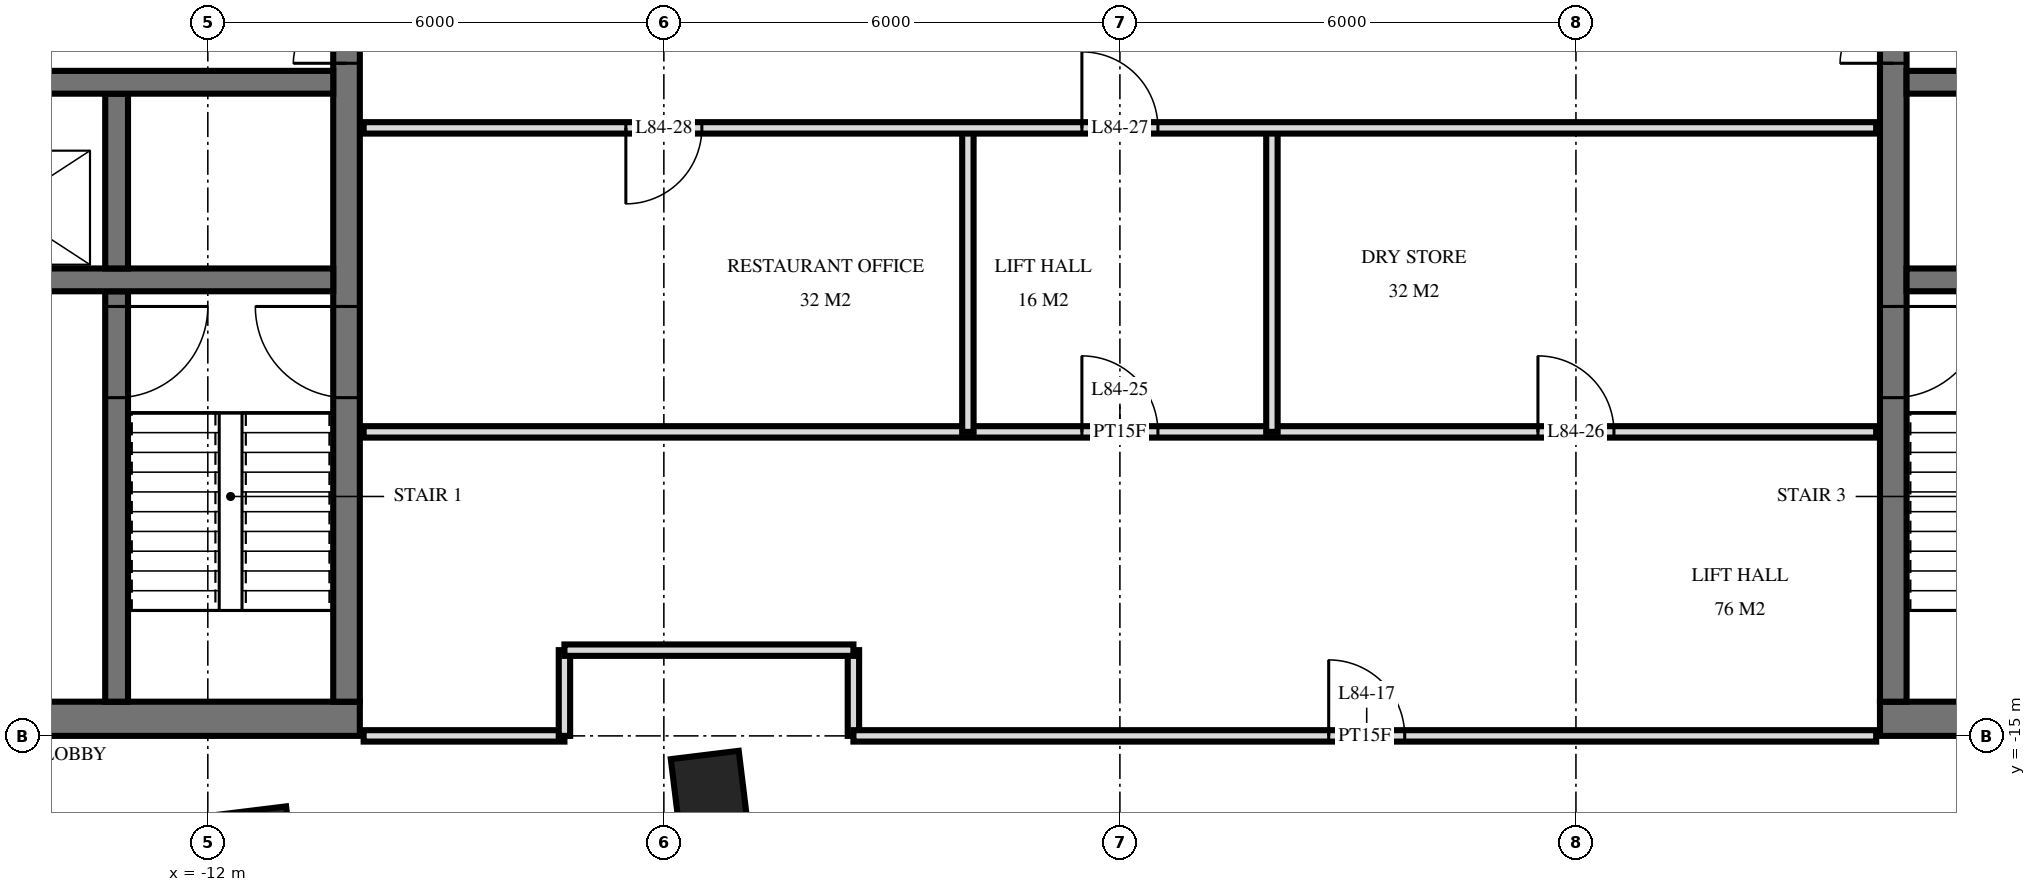
"""IFC4 building model, lengths in metres.
Left out: names, types, materials, properties, quantities, classifications, styles, units other than length and angle.
Written with IfcOpenShell. Run it as: python <this file> out.ifc"""

import sys

from ifc_helpers import new_model, si_unit, direction, frame, frame_2d, origin, origin_2d, place, context, subcontext, project, spatial, rectangle, extrude, element, fill, save


model = new_model("IFC4")
c1 = context("Model", 3, precision=1e-05, world=origin(), true_north=direction((0.0, 1.0)))
c2 = subcontext(c1, "Body", "Model", "MODEL_VIEW")
j1 = project(units=[si_unit("LENGTHUNIT", "METRE"), si_unit("PLANEANGLEUNIT", "RADIAN")], contexts=[c1])
p1 = place(None, origin())
s1 = spatial("IfcSite", under=j1, at=p1, CompositionType="ELEMENT")
p2 = place(p1, origin())
s2 = spatial("IfcBuilding", under=s1, at=p2, CompositionType="ELEMENT")
p3 = place(p2, frame((0.0, 0.0, 318.6)))
s3 = spatial("IfcBuildingStorey", under=s2, at=p3, CompositionType="ELEMENT", Elevation=318.6)
for number, where, z_axis, x_axis in (
    (1, (-11.362, -16.429, 0.0), (0.0, 0.0, 1.0), (0.993, 0.122, 0.0)),
    (2, (-5.407, -15.698, 0.0), (0.0, 0.0, 1.0), (0.993, 0.122, 0.0)),
):
    element("IfcColumn", number, at=place(p3, frame(where, z_axis=z_axis, x_axis=x_axis)), inside=s3, PredefinedType="COLUMN", context=c2, shape_type="SweptSolid", body=[
        extrude(rectangle(XDim=0.9, YDim=0.9, at=origin_2d()), origin(), (0.0, 0.0, 1.0), 4.0),
    ])
p4 = place(p3, frame((-19.5, -14.775, 0.0), z_axis=(0.0, 0.0, 1.0), x_axis=(1.0, 0.0, 0.0)))
e3 = element("IfcWall", 3, at=p4, inside=s3, PredefinedType="SHEAR", context=c2, shape_type="SweptSolid", body=[
    extrude(rectangle(XDim=9.5, YDim=0.45, at=frame_2d((4.75, 0.0))), origin(), (0.0, 0.0, 1.0), 4.0),
])
p5 = place(p4, frame((1.2, 0.0, 0.0)))
e4 = element("IfcOpeningElement", 4, at=p5, cuts=e3, PredefinedType="OPENING", context=c2, shape_type="SweptSolid", body=[
    extrude(rectangle(XDim=1.2, YDim=2.1, at=frame_2d((0.6, 1.05))), frame((0.0, 0.235, 0.0), z_axis=(0.0, -1.0, 0.0), x_axis=(1.0, 0.0, 0.0)), (0.0, 0.0, 1.0), 0.47),
])
p6 = place(p4, frame((4.25, 0.0, 0.0)))
e5 = element("IfcOpeningElement", 5, at=p6, cuts=e3, PredefinedType="OPENING", context=c2, shape_type="SweptSolid", body=[
    extrude(rectangle(XDim=1.1, YDim=2.1, at=frame_2d((0.55, 1.05))), frame((0.0, 0.235, 0.0), z_axis=(0.0, -1.0, 0.0), x_axis=(1.0, 0.0, 0.0)), (0.0, 0.0, 1.0), 0.47),
])
p7 = place(p3, frame((-10.175, -14.55, 0.0), z_axis=(0.0, 0.0, 1.0), x_axis=(0.0, 1.0, 0.0)))
e6 = element("IfcWall", 6, at=p7, inside=s3, PredefinedType="SHEAR", context=c2, shape_type="SweptSolid", body=[
    extrude(rectangle(XDim=14.1, YDim=0.35, at=frame_2d((7.05, 0.0))), origin(), (0.0, 0.0, 1.0), 4.0),
])
p8 = place(p7, frame((8.4, 0.0, 0.0)))
e7 = element("IfcOpeningElement", 7, at=p8, cuts=e6, PredefinedType="OPENING", context=c2, shape_type="SweptSolid", body=[
    extrude(rectangle(XDim=1.4, YDim=2.4, at=frame_2d((0.7, 1.2))), frame((0.0, 0.185, 0.0), z_axis=(0.0, -1.0, 0.0), x_axis=(1.0, 0.0, 0.0)), (0.0, 0.0, 1.0), 0.37),
])
p9 = place(p7, frame((10.0, 0.0, 0.0)))
e8 = element("IfcOpeningElement", 8, at=p9, cuts=e6, PredefinedType="OPENING", context=c2, shape_type="SweptSolid", body=[
    extrude(rectangle(XDim=1.4, YDim=2.4, at=frame_2d((0.7, 1.2))), frame((0.0, 0.185, 0.0), z_axis=(0.0, -1.0, 0.0), x_axis=(1.0, 0.0, 0.0)), (0.0, 0.0, 1.0), 0.37),
])
p10 = place(p7, frame((4.0, 0.0, 0.0)))
e9 = element("IfcOpeningElement", 9, at=p10, cuts=e6, PredefinedType="OPENING", context=c2, shape_type="SweptSolid", body=[
    extrude(rectangle(XDim=1.2, YDim=2.1, at=frame_2d((0.6, 1.05))), frame((0.0, 0.185, 0.0), z_axis=(0.0, -1.0, 0.0), x_axis=(1.0, 0.0, 0.0)), (0.0, 0.0, 1.0), 0.37),
])
p11 = place(p3, frame((-19.05, -6.4, 0.0), z_axis=(0.0, 0.0, 1.0), x_axis=(1.0, 0.0, 0.0)))
e10 = element("IfcWall", 10, at=p11, inside=s3, PredefinedType="SHEAR", context=c2, shape_type="SweptSolid", body=[
    extrude(rectangle(XDim=8.7, YDim=0.3, at=frame_2d((4.35, 0.0))), origin(), (0.0, 0.0, 1.0), 4.0),
])
p12 = place(p11, frame((0.8, 0.0, 0.0)))
e11 = element("IfcOpeningElement", 11, at=p12, cuts=e10, PredefinedType="OPENING", context=c2, shape_type="SweptSolid", body=[
    extrude(rectangle(XDim=1.1, YDim=2.1, at=frame_2d((0.55, 1.05))), frame((0.0, 0.16, 0.0), z_axis=(0.0, -1.0, 0.0), x_axis=(1.0, 0.0, 0.0)), (0.0, 0.0, 1.0), 0.32),
])
p13 = place(p3, frame((-19.05, -9.0, 0.0), z_axis=(0.0, 0.0, 1.0), x_axis=(1.0, 0.0, 0.0)))
e12 = element("IfcWall", 12, at=p13, inside=s3, PredefinedType="SHEAR", context=c2, shape_type="SweptSolid", body=[
    extrude(rectangle(XDim=8.7, YDim=0.3, at=frame_2d((4.35, 0.0))), origin(), (0.0, 0.0, 1.0), 4.0),
])
p14 = place(p13, frame((3.8, 0.0, 0.0)))
e13 = element("IfcOpeningElement", 13, at=p14, cuts=e12, PredefinedType="OPENING", context=c2, shape_type="SweptSolid", body=[
    extrude(rectangle(XDim=1.1, YDim=2.1, at=frame_2d((0.55, 1.05))), frame((0.0, 0.16, 0.0), z_axis=(0.0, -1.0, 0.0), x_axis=(1.0, 0.0, 0.0)), (0.0, 0.0, 1.0), 0.32),
])
p15 = place(p3, frame((-13.2, -8.85, 0.0), z_axis=(0.0, 0.0, 1.0), x_axis=(0.0, 1.0, 0.0)))
e14 = element("IfcWall", 14, at=p15, inside=s3, PredefinedType="SHEAR", context=c2, shape_type="SweptSolid", body=[
    extrude(rectangle(XDim=2.3, YDim=0.3, at=frame_2d((1.15, 0.0))), origin(), (0.0, 0.0, 1.0), 4.0),
])
p16 = place(p3, frame((-13.2, -14.55, 0.0), z_axis=(0.0, 0.0, 1.0), x_axis=(0.0, 1.0, 0.0)))
e15 = element("IfcWall", 15, at=p16, inside=s3, PredefinedType="SHEAR", context=c2, shape_type="SweptSolid", body=[
    extrude(rectangle(XDim=5.4, YDim=0.3, at=frame_2d((2.7, 0.0))), origin(), (0.0, 0.0, 1.0), 4.0),
])
p17 = place(p16, frame((4.0, 0.0, 0.0)))
e16 = element("IfcOpeningElement", 16, at=p17, cuts=e15, PredefinedType="OPENING", context=c2, shape_type="SweptSolid", body=[
    extrude(rectangle(XDim=1.2, YDim=2.1, at=frame_2d((0.6, 1.05))), frame((0.0, 0.16, 0.0), z_axis=(0.0, -1.0, 0.0), x_axis=(1.0, 0.0, 0.0)), (0.0, 0.0, 1.0), 0.32),
])
p18 = place(p3, frame((10.0, -14.775, 0.0), z_axis=(0.0, 0.0, 1.0), x_axis=(1.0, 0.0, 0.0)))
e17 = element("IfcWall", 17, at=p18, inside=s3, PredefinedType="SHEAR", context=c2, shape_type="SweptSolid", body=[
    extrude(rectangle(XDim=9.5, YDim=0.45, at=frame_2d((4.75, 0.0))), origin(), (0.0, 0.0, 1.0), 4.0),
])
p19 = place(p18, frame((7.1, 0.0, 0.0)))
e18 = element("IfcOpeningElement", 18, at=p19, cuts=e17, PredefinedType="OPENING", context=c2, shape_type="SweptSolid", body=[
    extrude(rectangle(XDim=1.2, YDim=2.1, at=frame_2d((0.6, 1.05))), frame((0.0, 0.235, 0.0), z_axis=(0.0, -1.0, 0.0), x_axis=(1.0, 0.0, 0.0)), (0.0, 0.0, 1.0), 0.47),
])
p20 = place(p18, frame((4.15, 0.0, 0.0)))
e19 = element("IfcOpeningElement", 19, at=p20, cuts=e17, PredefinedType="OPENING", context=c2, shape_type="SweptSolid", body=[
    extrude(rectangle(XDim=1.1, YDim=2.1, at=frame_2d((0.55, 1.05))), frame((0.0, 0.235, 0.0), z_axis=(0.0, -1.0, 0.0), x_axis=(1.0, 0.0, 0.0)), (0.0, 0.0, 1.0), 0.47),
])
p21 = place(p3, frame((10.175, -14.55, 0.0), z_axis=(0.0, 0.0, 1.0), x_axis=(0.0, 1.0, 0.0)))
e20 = element("IfcWall", 20, at=p21, inside=s3, PredefinedType="SHEAR", context=c2, shape_type="SweptSolid", body=[
    extrude(rectangle(XDim=14.1, YDim=0.35, at=frame_2d((7.05, 0.0))), origin(), (0.0, 0.0, 1.0), 4.0),
])
p22 = place(p21, frame((8.4, 0.0, 0.0)))
e21 = element("IfcOpeningElement", 21, at=p22, cuts=e20, PredefinedType="OPENING", context=c2, shape_type="SweptSolid", body=[
    extrude(rectangle(XDim=1.4, YDim=2.4, at=frame_2d((0.7, 1.2))), frame((0.0, 0.185, 0.0), z_axis=(0.0, -1.0, 0.0), x_axis=(1.0, 0.0, 0.0)), (0.0, 0.0, 1.0), 0.37),
])
p23 = place(p21, frame((10.0, 0.0, 0.0)))
e22 = element("IfcOpeningElement", 22, at=p23, cuts=e20, PredefinedType="OPENING", context=c2, shape_type="SweptSolid", body=[
    extrude(rectangle(XDim=1.4, YDim=2.4, at=frame_2d((0.7, 1.2))), frame((0.0, 0.185, 0.0), z_axis=(0.0, -1.0, 0.0), x_axis=(1.0, 0.0, 0.0)), (0.0, 0.0, 1.0), 0.37),
])
p24 = place(p21, frame((4.0, 0.0, 0.0)))
e23 = element("IfcOpeningElement", 23, at=p24, cuts=e20, PredefinedType="OPENING", context=c2, shape_type="SweptSolid", body=[
    extrude(rectangle(XDim=1.2, YDim=2.1, at=frame_2d((0.6, 1.05))), frame((0.0, 0.185, 0.0), z_axis=(0.0, -1.0, 0.0), x_axis=(1.0, 0.0, 0.0)), (0.0, 0.0, 1.0), 0.37),
])
p25 = place(p3, frame((10.35, -6.4, 0.0), z_axis=(0.0, 0.0, 1.0), x_axis=(1.0, 0.0, 0.0)))
e24 = element("IfcWall", 24, at=p25, inside=s3, PredefinedType="SHEAR", context=c2, shape_type="SweptSolid", body=[
    extrude(rectangle(XDim=8.7, YDim=0.3, at=frame_2d((4.35, 0.0))), origin(), (0.0, 0.0, 1.0), 4.0),
])
p26 = place(p25, frame((6.8, 0.0, 0.0)))
e25 = element("IfcOpeningElement", 25, at=p26, cuts=e24, PredefinedType="OPENING", context=c2, shape_type="SweptSolid", body=[
    extrude(rectangle(XDim=1.1, YDim=2.1, at=frame_2d((0.55, 1.05))), frame((0.0, 0.16, 0.0), z_axis=(0.0, -1.0, 0.0), x_axis=(1.0, 0.0, 0.0)), (0.0, 0.0, 1.0), 0.32),
])
p27 = place(p3, frame((10.35, -9.0, 0.0), z_axis=(0.0, 0.0, 1.0), x_axis=(1.0, 0.0, 0.0)))
e26 = element("IfcWall", 26, at=p27, inside=s3, PredefinedType="SHEAR", context=c2, shape_type="SweptSolid", body=[
    extrude(rectangle(XDim=8.7, YDim=0.3, at=frame_2d((4.35, 0.0))), origin(), (0.0, 0.0, 1.0), 4.0),
])
p28 = place(p27, frame((3.8, 0.0, 0.0)))
e27 = element("IfcOpeningElement", 27, at=p28, cuts=e26, PredefinedType="OPENING", context=c2, shape_type="SweptSolid", body=[
    extrude(rectangle(XDim=1.1, YDim=2.1, at=frame_2d((0.55, 1.05))), frame((0.0, 0.16, 0.0), z_axis=(0.0, -1.0, 0.0), x_axis=(1.0, 0.0, 0.0)), (0.0, 0.0, 1.0), 0.32),
])
for number, where, z_axis, x_axis in (
    (28, (2.0, -11.0, 0.0), (0.0, 0.0, 1.0), (0.0, 1.0, 0.0)),
    (29, (-2.0, -11.0, 0.0), (0.0, 0.0, 1.0), (0.0, 1.0, 0.0)),
):
    element("IfcWall", number, at=place(p3, frame(where, z_axis=z_axis, x_axis=x_axis)), inside=s3, PredefinedType="PARTITIONING", context=c2, shape_type="SweptSolid", body=[
        extrude(rectangle(XDim=4.0, YDim=0.15, at=frame_2d((2.0, 0.0))), origin(), (0.0, 0.0, 1.0), 3.72),
    ])
for number, where, z_axis, x_axis in (
    (30, (-3.506, -15.0, 0.0), (0.0, 0.0, 1.0), (0.0, 1.0, 0.0)),
    (31, (-7.308, -15.0, 0.0), (0.0, 0.0, 1.0), (0.0, 1.0, 0.0)),
):
    element("IfcWall", number, at=place(p3, frame(where, z_axis=z_axis, x_axis=x_axis)), inside=s3, PredefinedType="PARTITIONING", context=c2, shape_type="SweptSolid", body=[
        extrude(rectangle(XDim=1.128, YDim=0.15, at=frame_2d((0.564, 0.0))), origin(), (0.0, 0.0, 1.0), 3.72),
    ])
p29 = place(p3, frame((-9.95, -15.0, 0.0), z_axis=(0.0, 0.0, 1.0), x_axis=(1.0, 0.0, 0.0)))
e32 = element("IfcWall", 32, at=p29, inside=s3, PredefinedType="PARTITIONING", context=c2, shape_type="SweptSolid", body=[
    extrude(rectangle(XDim=2.642, YDim=0.15, at=frame_2d((1.321, 0.0))), origin(), (0.0, 0.0, 1.0), 3.084),
])
p30 = place(p3, frame((-3.506, -15.0, 0.0), z_axis=(0.0, 0.0, 1.0), x_axis=(1.0, 0.0, 0.0)))
e33 = element("IfcWall", 33, at=p30, inside=s3, PredefinedType="PARTITIONING", context=c2, shape_type="SweptSolid", body=[
    extrude(rectangle(XDim=13.456, YDim=0.15, at=frame_2d((6.728, 0.0))), origin(), (0.0, 0.0, 1.0), 3.084),
])
p31 = place(p30, frame((6.253, 0.0, 0.0)))
e34 = element("IfcOpeningElement", 34, at=p31, cuts=e33, PredefinedType="OPENING", context=c2, shape_type="SweptSolid", body=[
    extrude(rectangle(XDim=1.0, YDim=2.1, at=frame_2d((0.5, 1.05))), frame((0.0, 0.085, 0.0), z_axis=(0.0, -1.0, 0.0), x_axis=(1.0, 0.0, 0.0)), (0.0, 0.0, 1.0), 0.17),
])
p32 = place(p3, frame((-7.308, -13.872, 0.0), z_axis=(0.0, 0.0, 1.0), x_axis=(1.0, 0.0, 0.0)))
e35 = element("IfcWall", 35, at=p32, inside=s3, PredefinedType="PARTITIONING", context=c2, shape_type="SweptSolid", body=[
    extrude(rectangle(XDim=3.802, YDim=0.15, at=frame_2d((1.901, 0.0))), origin(), (0.0, 0.0, 1.0), 3.72),
])
p33 = place(p3, frame((-9.95, -11.0, 0.0), z_axis=(0.0, 0.0, 1.0), x_axis=(1.0, 0.0, 0.0)))
e36 = element("IfcWall", 36, at=p33, inside=s3, PredefinedType="PARTITIONING", context=c2, shape_type="SweptSolid", body=[
    extrude(rectangle(XDim=19.9, YDim=0.15, at=frame_2d((9.95, 0.0))), origin(), (0.0, 0.0, 1.0), 3.72),
])
p34 = place(p33, frame((9.45, 0.0, 0.0)))
e37 = element("IfcOpeningElement", 37, at=p34, cuts=e36, PredefinedType="OPENING", context=c2, shape_type="SweptSolid", body=[
    extrude(rectangle(XDim=1.0, YDim=2.1, at=frame_2d((0.5, 1.05))), frame((0.0, 0.085, 0.0), z_axis=(0.0, -1.0, 0.0), x_axis=(1.0, 0.0, 0.0)), (0.0, 0.0, 1.0), 0.17),
])
p35 = place(p33, frame((15.45, 0.0, 0.0)))
e38 = element("IfcOpeningElement", 38, at=p35, cuts=e36, PredefinedType="OPENING", context=c2, shape_type="SweptSolid", body=[
    extrude(rectangle(XDim=1.0, YDim=2.1, at=frame_2d((0.5, 1.05))), frame((0.0, 0.085, 0.0), z_axis=(0.0, -1.0, 0.0), x_axis=(1.0, 0.0, 0.0)), (0.0, 0.0, 1.0), 0.17),
])
p36 = place(p3, frame((-9.95, -7.0, 0.0), z_axis=(0.0, 0.0, 1.0), x_axis=(1.0, 0.0, 0.0)))
e39 = element("IfcWall", 39, at=p36, inside=s3, PredefinedType="PARTITIONING", context=c2, shape_type="SweptSolid", body=[
    extrude(rectangle(XDim=19.9, YDim=0.15, at=frame_2d((9.95, 0.0))), origin(), (0.0, 0.0, 1.0), 3.72),
])
p37 = place(p36, frame((9.45, 0.0, 0.0)))
e40 = element("IfcOpeningElement", 40, at=p37, cuts=e39, PredefinedType="OPENING", context=c2, shape_type="SweptSolid", body=[
    extrude(rectangle(XDim=1.0, YDim=2.1, at=frame_2d((0.5, 1.05))), frame((0.0, 0.085, 0.0), z_axis=(0.0, -1.0, 0.0), x_axis=(1.0, 0.0, 0.0)), (0.0, 0.0, 1.0), 0.17),
])
p38 = place(p36, frame((3.45, 0.0, 0.0)))
e41 = element("IfcOpeningElement", 41, at=p38, cuts=e39, PredefinedType="OPENING", context=c2, shape_type="SweptSolid", body=[
    extrude(rectangle(XDim=1.0, YDim=2.1, at=frame_2d((0.5, 1.05))), frame((0.0, 0.085, 0.0), z_axis=(0.0, -1.0, 0.0), x_axis=(1.0, 0.0, 0.0)), (0.0, 0.0, 1.0), 0.17),
])
p39 = place(p8, origin())
e42 = element("IfcDoor", 42, at=p39, inside=s3, OperationType="DOUBLE_DOOR_SINGLE_SWING", PredefinedType="DOOR", context=c2, shape_type="SweptSolid", body=[
    extrude(rectangle(XDim=1.4, YDim=2.4, at=frame_2d((0.7, 1.2))), frame((0.0, 0.025, 0.0), z_axis=(0.0, -1.0, 0.0), x_axis=(1.0, 0.0, 0.0)), (0.0, 0.0, 1.0), 0.05),
])
fill(e7, e42)
p40 = place(p10, origin())
e43 = element("IfcDoor", 43, at=p40, inside=s3, OperationType="SINGLE_SWING_LEFT", PredefinedType="DOOR", context=c2, shape_type="SweptSolid", body=[
    extrude(rectangle(XDim=1.2, YDim=2.1, at=frame_2d((0.6, 1.05))), frame((0.0, 0.025, 0.0), z_axis=(0.0, -1.0, 0.0), x_axis=(1.0, 0.0, 0.0)), (0.0, 0.0, 1.0), 0.05),
])
fill(e9, e43)
p41 = place(p17, frame((0.6, 0.0, 0.0), z_axis=(0.0, 0.0, 1.0), x_axis=(-1.0, 0.0, 0.0)))
e44 = element("IfcDoor", 44, at=p41, inside=s3, OperationType="SINGLE_SWING_RIGHT", PredefinedType="DOOR", context=c2, shape_type="SweptSolid", body=[
    extrude(rectangle(XDim=1.2, YDim=2.1, at=frame_2d((0.0, 1.05))), frame((0.0, -0.025, 0.0), z_axis=(0.0, 1.0, 0.0), x_axis=(-1.0, 0.0, 0.0)), (0.0, 0.0, 1.0), 0.05),
])
fill(e16, e44)
p42 = place(p22, origin())
e45 = element("IfcDoor", 45, at=p42, inside=s3, OperationType="DOUBLE_DOOR_SINGLE_SWING", PredefinedType="DOOR", context=c2, shape_type="SweptSolid", body=[
    extrude(rectangle(XDim=1.4, YDim=2.4, at=frame_2d((0.7, 1.2))), frame((0.0, 0.025, 0.0), z_axis=(0.0, -1.0, 0.0), x_axis=(1.0, 0.0, 0.0)), (0.0, 0.0, 1.0), 0.05),
])
fill(e21, e45)
p43 = place(p24, frame((0.6, 0.0, 0.0), z_axis=(0.0, 0.0, 1.0), x_axis=(-1.0, 0.0, 0.0)))
e46 = element("IfcDoor", 46, at=p43, inside=s3, OperationType="SINGLE_SWING_RIGHT", PredefinedType="DOOR", context=c2, shape_type="SweptSolid", body=[
    extrude(rectangle(XDim=1.2, YDim=2.1, at=frame_2d((0.0, 1.05))), frame((0.0, -0.025, 0.0), z_axis=(0.0, 1.0, 0.0), x_axis=(-1.0, 0.0, 0.0)), (0.0, 0.0, 1.0), 0.05),
])
fill(e23, e46)
p44 = place(p31, origin())
e47 = element("IfcDoor", 47, at=p44, inside=s3, OperationType="SINGLE_SWING_RIGHT", PredefinedType="DOOR", context=c2, shape_type="SweptSolid", body=[
    extrude(rectangle(XDim=1.0, YDim=2.1, at=frame_2d((0.5, 1.05))), frame((0.0, 0.025, 0.0), z_axis=(0.0, -1.0, 0.0), x_axis=(1.0, 0.0, 0.0)), (0.0, 0.0, 1.0), 0.05),
])
fill(e34, e47)
p45 = place(p34, origin())
e48 = element("IfcDoor", 48, at=p45, inside=s3, OperationType="SINGLE_SWING_RIGHT", PredefinedType="DOOR", context=c2, shape_type="SweptSolid", body=[
    extrude(rectangle(XDim=1.0, YDim=2.1, at=frame_2d((0.5, 1.05))), frame((0.0, 0.025, 0.0), z_axis=(0.0, -1.0, 0.0), x_axis=(1.0, 0.0, 0.0)), (0.0, 0.0, 1.0), 0.05),
])
fill(e37, e48)
p46 = place(p35, origin())
e49 = element("IfcDoor", 49, at=p46, inside=s3, OperationType="SINGLE_SWING_RIGHT", PredefinedType="DOOR", context=c2, shape_type="SweptSolid", body=[
    extrude(rectangle(XDim=1.0, YDim=2.1, at=frame_2d((0.5, 1.05))), frame((0.0, 0.025, 0.0), z_axis=(0.0, -1.0, 0.0), x_axis=(1.0, 0.0, 0.0)), (0.0, 0.0, 1.0), 0.05),
])
fill(e38, e49)
p47 = place(p37, origin())
e50 = element("IfcDoor", 50, at=p47, inside=s3, OperationType="SINGLE_SWING_RIGHT", PredefinedType="DOOR", context=c2, shape_type="SweptSolid", body=[
    extrude(rectangle(XDim=1.0, YDim=2.1, at=frame_2d((0.5, 1.05))), frame((0.0, 0.025, 0.0), z_axis=(0.0, -1.0, 0.0), x_axis=(1.0, 0.0, 0.0)), (0.0, 0.0, 1.0), 0.05),
])
fill(e40, e50)
p48 = place(p38, frame((0.5, 0.0, 0.0), z_axis=(0.0, 0.0, 1.0), x_axis=(-1.0, 0.0, 0.0)))
e51 = element("IfcDoor", 51, at=p48, inside=s3, OperationType="SINGLE_SWING_LEFT", PredefinedType="DOOR", context=c2, shape_type="SweptSolid", body=[
    extrude(rectangle(XDim=1.0, YDim=2.1, at=frame_2d((0.0, 1.05))), frame((0.0, -0.025, 0.0), z_axis=(0.0, 1.0, 0.0), x_axis=(-1.0, 0.0, 0.0)), (0.0, 0.0, 1.0), 0.05),
])
fill(e41, e51)
save(model, sys.argv[1])
